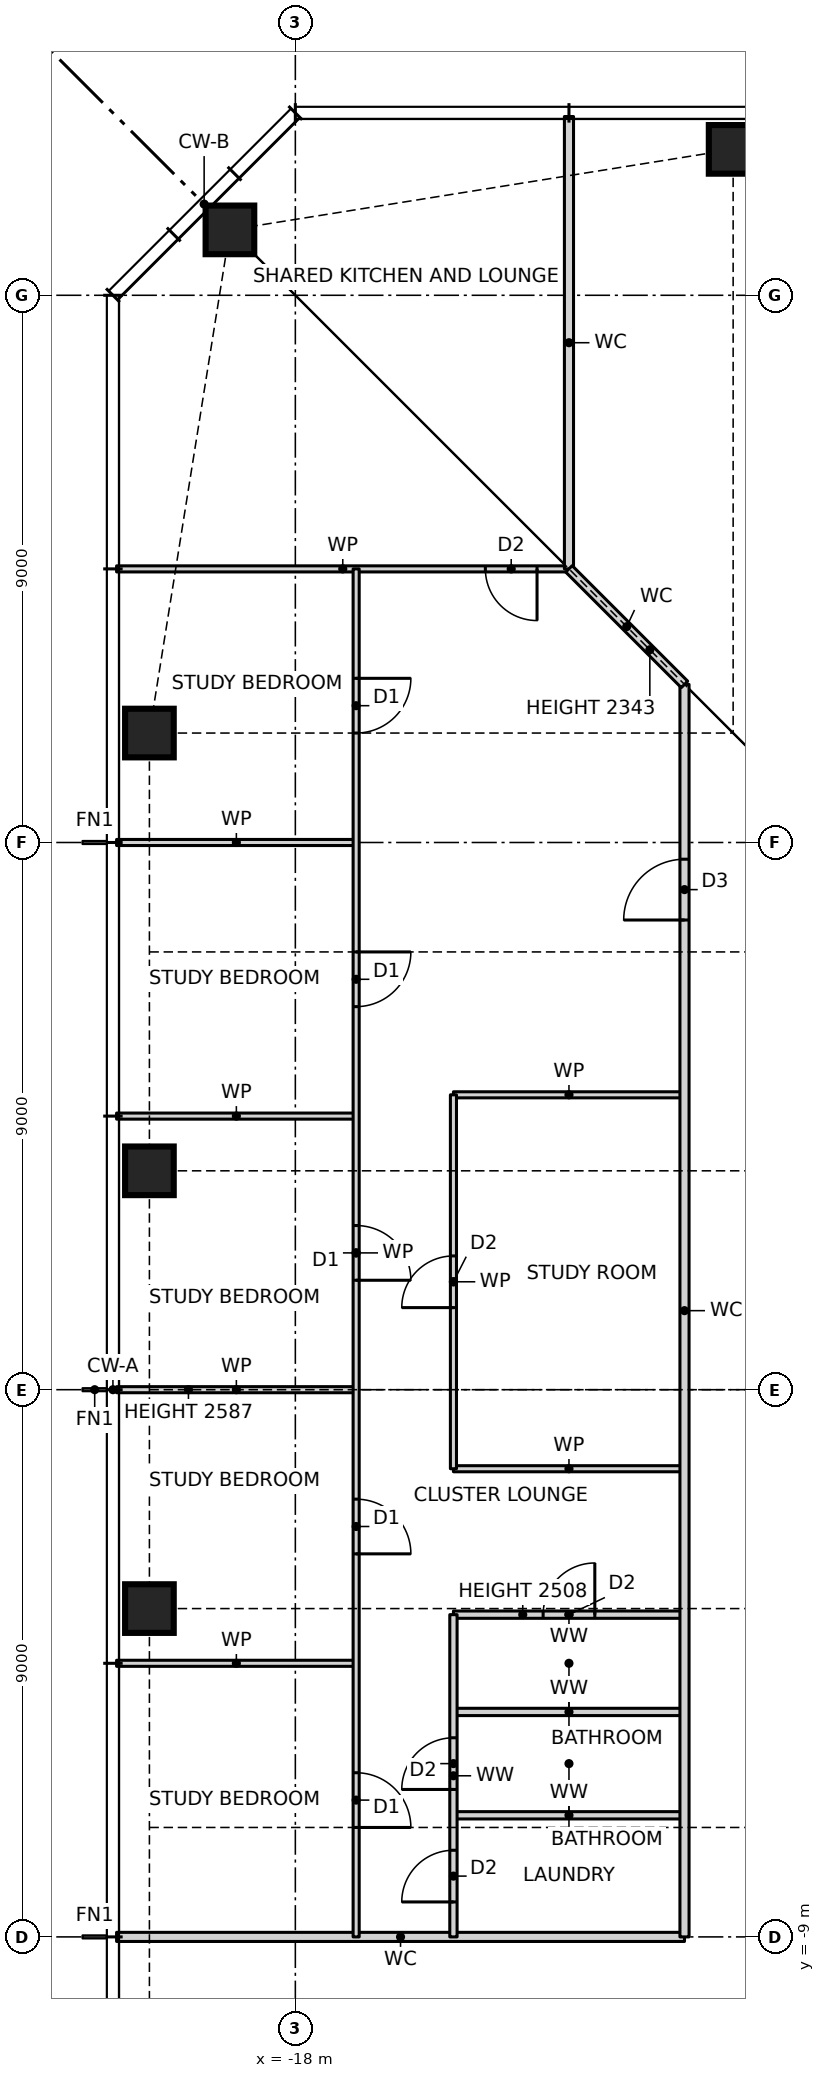
"""IFC4 building model, lengths in metres.
Left out: names, types, materials, properties, quantities, classifications, styles, units other than length and angle.
Written with IfcOpenShell. Run it as: python <this file> out.ifc"""

import sys

from ifc_helpers import new_model, si_unit, direction, frame, frame_2d, origin, origin_2d, place, context, subcontext, project, spatial, rectangle, hollow_rectangle, extrude, element, fill, save


model = new_model("IFC4")
c1 = context("Model", 3, precision=1e-05, world=origin(), true_north=direction((0.0, 1.0)))
c2 = subcontext(c1, "Body", "Model", "MODEL_VIEW")
j1 = project(units=[si_unit("LENGTHUNIT", "METRE"), si_unit("PLANEANGLEUNIT", "RADIAN")], contexts=[c1])
p1 = place(None, origin())
s1 = spatial("IfcSite", under=j1, at=p1, CompositionType="ELEMENT")
p2 = place(p1, origin())
s2 = spatial("IfcBuilding", under=s1, at=p2, CompositionType="ELEMENT")
p3 = place(p2, frame((0.0, 0.0, 94.5)))
s3 = spatial("IfcBuildingStorey", under=s2, at=p3, CompositionType="ELEMENT", Elevation=94.5)
for number, where, z_axis, x_axis in (
    (1, (-10.8, 20.4, 0.0), (0.0, 0.0, 1.0), (1.0, 0.0, 0.0)),
    (2, (-19.076, 19.076, 0.0), (0.0, 0.0, 1.0), (1.0, 0.0, 0.0)),
    (3, (-20.4, 10.8, 0.0), (0.0, 0.0, 1.0), (1.0, 0.0, 0.0)),
    (4, (-20.4, 3.6, 0.0), (0.0, 0.0, 1.0), (1.0, 0.0, 0.0)),
    (5, (-20.4, -3.6, 0.0), (0.0, 0.0, 1.0), (1.0, 0.0, 0.0)),
):
    element("IfcColumn", number, at=place(p3, frame(where, z_axis=z_axis, x_axis=x_axis)), inside=s3, PredefinedType="COLUMN", context=c2, shape_type="SweptSolid", body=[
        extrude(hollow_rectangle(XDim=0.8, YDim=0.8, WallThickness=0.07, at=origin_2d()), origin(), (0.0, 0.0, 1.0), 3.5),
    ])
p4 = place(p3, frame((-20.94, -9.0, 0.0), z_axis=(0.0, 0.0, 1.0), x_axis=(1.0, 0.0, 0.0)))
e6 = element("IfcWall", 6, at=p4, inside=s3, PredefinedType="PARTITIONING", context=c2, shape_type="SweptSolid", body=[
    extrude(rectangle(XDim=9.34, YDim=0.15, at=frame_2d((4.67, 0.0))), origin(), (0.0, 0.0, 1.0), 3.27),
])
for number, where, z_axis, x_axis in (
    (7, (-15.4, -7.0, 0.0), (0.0, 0.0, 1.0), (1.0, 0.0, 0.0)),
    (8, (-15.4, -5.3, 0.0), (0.0, 0.0, 1.0), (1.0, 0.0, 0.0)),
):
    element("IfcWall", number, at=place(p3, frame(where, z_axis=z_axis, x_axis=x_axis)), inside=s3, PredefinedType="PARTITIONING", context=c2, shape_type="SweptSolid", body=[
        extrude(rectangle(XDim=3.8, YDim=0.12, at=frame_2d((1.9, 0.0))), origin(), (0.0, 0.0, 1.0), 3.27),
    ])
p5 = place(p3, frame((-20.94, -4.5, 0.0), z_axis=(0.0, 0.0, 1.0), x_axis=(1.0, 0.0, 0.0)))
e9 = element("IfcWall", 9, at=p5, inside=s3, PredefinedType="PARTITIONING", context=c2, shape_type="SweptSolid", body=[
    extrude(rectangle(XDim=3.94, YDim=0.1, at=frame_2d((1.97, 0.0))), origin(), (0.0, 0.0, 1.0), 3.27),
])
p6 = place(p3, frame((-15.4, -3.7, 0.0), z_axis=(0.0, 0.0, 1.0), x_axis=(1.0, 0.0, 0.0)))
e10 = element("IfcWall", 10, at=p6, inside=s3, PredefinedType="PARTITIONING", context=c2, shape_type="SweptSolid", body=[
    extrude(rectangle(XDim=3.8, YDim=0.12, at=frame_2d((1.9, 0.0))), origin(), (0.0, 0.0, 1.0), 2.508),
])
p7 = place(p6, frame((1.475, 0.0, 0.0)))
e11 = element("IfcOpeningElement", 11, at=p7, cuts=e10, PredefinedType="OPENING", context=c2, shape_type="SweptSolid", body=[
    extrude(rectangle(XDim=0.85, YDim=2.1, at=frame_2d((0.425, 1.05))), frame((0.0, 0.07, 0.0), z_axis=(0.0, -1.0, 0.0), x_axis=(1.0, 0.0, 0.0)), (0.0, 0.0, 1.0), 0.14),
])
p8 = place(p3, frame((-15.4, -1.3, 0.0), z_axis=(0.0, 0.0, 1.0), x_axis=(1.0, 0.0, 0.0)))
e12 = element("IfcWall", 12, at=p8, inside=s3, PredefinedType="PARTITIONING", context=c2, shape_type="SweptSolid", body=[
    extrude(rectangle(XDim=3.8, YDim=0.1, at=frame_2d((1.9, 0.0))), origin(), (0.0, 0.0, 1.0), 3.27),
])
p9 = place(p3, frame((-20.94, 0.0, 0.0), z_axis=(0.0, 0.0, 1.0), x_axis=(1.0, 0.0, 0.0)))
e13 = element("IfcWall", 13, at=p9, inside=s3, PredefinedType="PARTITIONING", context=c2, shape_type="SweptSolid", body=[
    extrude(rectangle(XDim=3.94, YDim=0.1, at=frame_2d((1.97, 0.0))), origin(), (0.0, 0.0, 1.0), 2.587),
])
p10 = place(p3, frame((-20.94, 4.5, 0.0), z_axis=(0.0, 0.0, 1.0), x_axis=(1.0, 0.0, 0.0)))
e14 = element("IfcWall", 14, at=p10, inside=s3, PredefinedType="PARTITIONING", context=c2, shape_type="SweptSolid", body=[
    extrude(rectangle(XDim=3.94, YDim=0.1, at=frame_2d((1.97, 0.0))), origin(), (0.0, 0.0, 1.0), 3.27),
])
p11 = place(p3, frame((-15.4, 4.85, 0.0), z_axis=(0.0, 0.0, 1.0), x_axis=(1.0, 0.0, 0.0)))
e15 = element("IfcWall", 15, at=p11, inside=s3, PredefinedType="PARTITIONING", context=c2, shape_type="SweptSolid", body=[
    extrude(rectangle(XDim=3.8, YDim=0.1, at=frame_2d((1.9, 0.0))), origin(), (0.0, 0.0, 1.0), 3.27),
])
p12 = place(p3, frame((-20.94, 9.0, 0.0), z_axis=(0.0, 0.0, 1.0), x_axis=(1.0, 0.0, 0.0)))
e16 = element("IfcWall", 16, at=p12, inside=s3, PredefinedType="PARTITIONING", context=c2, shape_type="SweptSolid", body=[
    extrude(rectangle(XDim=3.94, YDim=0.1, at=frame_2d((1.97, 0.0))), origin(), (0.0, 0.0, 1.0), 3.27),
])
p13 = place(p3, frame((-20.94, 13.5, 0.0), z_axis=(0.0, 0.0, 1.0), x_axis=(1.0, 0.0, 0.0)))
e17 = element("IfcWall", 17, at=p13, inside=s3, PredefinedType="PARTITIONING", context=c2, shape_type="SweptSolid", body=[
    extrude(rectangle(XDim=7.44, YDim=0.1, at=frame_2d((3.72, 0.0))), origin(), (0.0, 0.0, 1.0), 3.27),
])
p14 = place(p13, frame((6.065, 0.0, 0.0)))
e18 = element("IfcOpeningElement", 18, at=p14, cuts=e17, PredefinedType="OPENING", context=c2, shape_type="SweptSolid", body=[
    extrude(rectangle(XDim=0.85, YDim=2.1, at=frame_2d((0.425, 1.05))), frame((0.0, 0.06, 0.0), z_axis=(0.0, -1.0, 0.0), x_axis=(1.0, 0.0, 0.0)), (0.0, 0.0, 1.0), 0.12),
])
p15 = place(p3, frame((-11.6, -9.0, 0.0), z_axis=(0.0, 0.0, 1.0), x_axis=(0.0, 1.0, 0.0)))
e19 = element("IfcWall", 19, at=p15, inside=s3, PredefinedType="PARTITIONING", context=c2, shape_type="SweptSolid", body=[
    extrude(rectangle(XDim=20.6, YDim=0.15, at=frame_2d((10.3, 0.0))), origin(), (0.0, 0.0, 1.0), 3.27),
])
p16 = place(p15, frame((16.725, 0.0, 0.0)))
e20 = element("IfcOpeningElement", 20, at=p16, cuts=e19, PredefinedType="OPENING", context=c2, shape_type="SweptSolid", body=[
    extrude(rectangle(XDim=1.0, YDim=2.1, at=frame_2d((0.5, 1.05))), frame((0.0, 0.085, 0.0), z_axis=(0.0, -1.0, 0.0), x_axis=(1.0, 0.0, 0.0)), (0.0, 0.0, 1.0), 0.17),
])
p17 = place(p3, frame((-13.5, 13.5, 0.0), z_axis=(0.0, 0.0, 1.0), x_axis=(0.0, 1.0, 0.0)))
e21 = element("IfcWall", 21, at=p17, inside=s3, PredefinedType="PARTITIONING", context=c2, shape_type="SweptSolid", body=[
    extrude(rectangle(XDim=7.44, YDim=0.15, at=frame_2d((3.72, 0.0))), origin(), (0.0, 0.0, 1.0), 3.27),
])
p18 = place(p3, frame((-15.4, -9.0, 0.0), z_axis=(0.0, 0.0, 1.0), x_axis=(0.0, 1.0, 0.0)))
e22 = element("IfcWall", 22, at=p18, inside=s3, PredefinedType="PARTITIONING", context=c2, shape_type="SweptSolid", body=[
    extrude(rectangle(XDim=5.3, YDim=0.12, at=frame_2d((2.65, 0.0))), origin(), (0.0, 0.0, 1.0), 3.27),
])
p19 = place(p18, frame((2.425, 0.0, 0.0)))
e23 = element("IfcOpeningElement", 23, at=p19, cuts=e22, PredefinedType="OPENING", context=c2, shape_type="SweptSolid", body=[
    extrude(rectangle(XDim=0.85, YDim=2.1, at=frame_2d((0.425, 1.05))), frame((0.0, 0.07, 0.0), z_axis=(0.0, -1.0, 0.0), x_axis=(1.0, 0.0, 0.0)), (0.0, 0.0, 1.0), 0.14),
])
p20 = place(p18, frame((0.575, 0.0, 0.0)))
e24 = element("IfcOpeningElement", 24, at=p20, cuts=e22, PredefinedType="OPENING", context=c2, shape_type="SweptSolid", body=[
    extrude(rectangle(XDim=0.85, YDim=2.1, at=frame_2d((0.425, 1.05))), frame((0.0, 0.07, 0.0), z_axis=(0.0, -1.0, 0.0), x_axis=(1.0, 0.0, 0.0)), (0.0, 0.0, 1.0), 0.14),
])
p21 = place(p3, frame((-15.4, -1.3, 0.0), z_axis=(0.0, 0.0, 1.0), x_axis=(0.0, 1.0, 0.0)))
e25 = element("IfcWall", 25, at=p21, inside=s3, PredefinedType="PARTITIONING", context=c2, shape_type="SweptSolid", body=[
    extrude(rectangle(XDim=6.15, YDim=0.1, at=frame_2d((3.075, 0.0))), origin(), (0.0, 0.0, 1.0), 3.27),
])
p22 = place(p21, frame((2.65, 0.0, 0.0)))
e26 = element("IfcOpeningElement", 26, at=p22, cuts=e25, PredefinedType="OPENING", context=c2, shape_type="SweptSolid", body=[
    extrude(rectangle(XDim=0.85, YDim=2.1, at=frame_2d((0.425, 1.05))), frame((0.0, 0.06, 0.0), z_axis=(0.0, -1.0, 0.0), x_axis=(1.0, 0.0, 0.0)), (0.0, 0.0, 1.0), 0.12),
])
p23 = place(p3, frame((-17.0, -9.0, 0.0), z_axis=(0.0, 0.0, 1.0), x_axis=(0.0, 1.0, 0.0)))
e27 = element("IfcWall", 27, at=p23, inside=s3, PredefinedType="PARTITIONING", context=c2, shape_type="SweptSolid", body=[
    extrude(rectangle(XDim=22.5, YDim=0.1, at=frame_2d((11.25, 0.0))), origin(), (0.0, 0.0, 1.0), 3.27),
])
p24 = place(p23, frame((19.8, 0.0, 0.0)))
e28 = element("IfcOpeningElement", 28, at=p24, cuts=e27, PredefinedType="OPENING", context=c2, shape_type="SweptSolid", body=[
    extrude(rectangle(XDim=0.9, YDim=2.1, at=frame_2d((0.45, 1.05))), frame((0.0, 0.06, 0.0), z_axis=(0.0, -1.0, 0.0), x_axis=(1.0, 0.0, 0.0)), (0.0, 0.0, 1.0), 0.12),
])
p25 = place(p23, frame((15.3, 0.0, 0.0)))
e29 = element("IfcOpeningElement", 29, at=p25, cuts=e27, PredefinedType="OPENING", context=c2, shape_type="SweptSolid", body=[
    extrude(rectangle(XDim=0.9, YDim=2.1, at=frame_2d((0.45, 1.05))), frame((0.0, 0.06, 0.0), z_axis=(0.0, -1.0, 0.0), x_axis=(1.0, 0.0, 0.0)), (0.0, 0.0, 1.0), 0.12),
])
p26 = place(p23, frame((10.8, 0.0, 0.0)))
e30 = element("IfcOpeningElement", 30, at=p26, cuts=e27, PredefinedType="OPENING", context=c2, shape_type="SweptSolid", body=[
    extrude(rectangle(XDim=0.9, YDim=2.1, at=frame_2d((0.45, 1.05))), frame((0.0, 0.06, 0.0), z_axis=(0.0, -1.0, 0.0), x_axis=(1.0, 0.0, 0.0)), (0.0, 0.0, 1.0), 0.12),
])
p27 = place(p23, frame((6.3, 0.0, 0.0)))
e31 = element("IfcOpeningElement", 31, at=p27, cuts=e27, PredefinedType="OPENING", context=c2, shape_type="SweptSolid", body=[
    extrude(rectangle(XDim=0.9, YDim=2.1, at=frame_2d((0.45, 1.05))), frame((0.0, 0.06, 0.0), z_axis=(0.0, -1.0, 0.0), x_axis=(1.0, 0.0, 0.0)), (0.0, 0.0, 1.0), 0.12),
])
p28 = place(p23, frame((1.8, 0.0, 0.0)))
e32 = element("IfcOpeningElement", 32, at=p28, cuts=e27, PredefinedType="OPENING", context=c2, shape_type="SweptSolid", body=[
    extrude(rectangle(XDim=0.9, YDim=2.1, at=frame_2d((0.45, 1.05))), frame((0.0, 0.06, 0.0), z_axis=(0.0, -1.0, 0.0), x_axis=(1.0, 0.0, 0.0)), (0.0, 0.0, 1.0), 0.12),
])
p29 = place(p3, frame((-11.6, 11.6, 0.0), z_axis=(0.0, 0.0, 1.0), x_axis=(-0.707106781187, 0.707106781187, 0.0)))
e33 = element("IfcWall", 33, at=p29, inside=s3, PredefinedType="PARTITIONING", context=c2, shape_type="SweptSolid", body=[
    extrude(rectangle(XDim=2.687, YDim=0.15, at=frame_2d((1.343, 0.0))), origin(), (0.0, 0.0, 1.0), 2.343),
])
p30 = place(p24, frame((0.9, 0.0, 0.0), z_axis=(0.0, 0.0, 1.0), x_axis=(-1.0, 0.0, 0.0)))
e34 = element("IfcDoor", 34, at=p30, inside=s3, OperationType="SINGLE_SWING_LEFT", PredefinedType="DOOR", context=c2, shape_type="SweptSolid", body=[
    extrude(rectangle(XDim=0.9, YDim=2.1, at=frame_2d((0.45, 1.05))), frame((0.0, 0.025, 0.0), z_axis=(0.0, -1.0, 0.0), x_axis=(1.0, 0.0, 0.0)), (0.0, 0.0, 1.0), 0.05),
])
fill(e28, e34)
p31 = place(p25, frame((0.9, 0.0, 0.0), z_axis=(0.0, 0.0, 1.0), x_axis=(-1.0, 0.0, 0.0)))
e35 = element("IfcDoor", 35, at=p31, inside=s3, OperationType="SINGLE_SWING_LEFT", PredefinedType="DOOR", context=c2, shape_type="SweptSolid", body=[
    extrude(rectangle(XDim=0.9, YDim=2.1, at=frame_2d((0.45, 1.05))), frame((0.0, 0.025, 0.0), z_axis=(0.0, -1.0, 0.0), x_axis=(1.0, 0.0, 0.0)), (0.0, 0.0, 1.0), 0.05),
])
fill(e29, e35)
p32 = place(p26, frame((0.9, 0.0, 0.0), z_axis=(0.0, 0.0, 1.0), x_axis=(-1.0, 0.0, 0.0)))
e36 = element("IfcDoor", 36, at=p32, inside=s3, OperationType="SINGLE_SWING_RIGHT", PredefinedType="DOOR", context=c2, shape_type="SweptSolid", body=[
    extrude(rectangle(XDim=0.9, YDim=2.1, at=frame_2d((0.45, 1.05))), frame((0.0, 0.025, 0.0), z_axis=(0.0, -1.0, 0.0), x_axis=(1.0, 0.0, 0.0)), (0.0, 0.0, 1.0), 0.05),
])
fill(e30, e36)
p33 = place(p27, frame((0.9, 0.0, 0.0), z_axis=(0.0, 0.0, 1.0), x_axis=(-1.0, 0.0, 0.0)))
e37 = element("IfcDoor", 37, at=p33, inside=s3, OperationType="SINGLE_SWING_RIGHT", PredefinedType="DOOR", context=c2, shape_type="SweptSolid", body=[
    extrude(rectangle(XDim=0.9, YDim=2.1, at=frame_2d((0.45, 1.05))), frame((0.0, 0.025, 0.0), z_axis=(0.0, -1.0, 0.0), x_axis=(1.0, 0.0, 0.0)), (0.0, 0.0, 1.0), 0.05),
])
fill(e31, e37)
p34 = place(p28, frame((0.9, 0.0, 0.0), z_axis=(0.0, 0.0, 1.0), x_axis=(-1.0, 0.0, 0.0)))
e38 = element("IfcDoor", 38, at=p34, inside=s3, OperationType="SINGLE_SWING_RIGHT", PredefinedType="DOOR", context=c2, shape_type="SweptSolid", body=[
    extrude(rectangle(XDim=0.9, YDim=2.1, at=frame_2d((0.45, 1.05))), frame((0.0, 0.025, 0.0), z_axis=(0.0, -1.0, 0.0), x_axis=(1.0, 0.0, 0.0)), (0.0, 0.0, 1.0), 0.05),
])
fill(e32, e38)
p35 = place(p16, origin())
e39 = element("IfcDoor", 39, at=p35, inside=s3, OperationType="SINGLE_SWING_LEFT", PredefinedType="DOOR", context=c2, shape_type="SweptSolid", body=[
    extrude(rectangle(XDim=1.0, YDim=2.1, at=frame_2d((0.5, 1.05))), frame((0.0, 0.025, 0.0), z_axis=(0.0, -1.0, 0.0), x_axis=(1.0, 0.0, 0.0)), (0.0, 0.0, 1.0), 0.05),
])
fill(e20, e39)
p36 = place(p22, origin())
e40 = element("IfcDoor", 40, at=p36, inside=s3, OperationType="SINGLE_SWING_LEFT", PredefinedType="DOOR", context=c2, shape_type="SweptSolid", body=[
    extrude(rectangle(XDim=0.85, YDim=2.1, at=frame_2d((0.425, 1.05))), frame((0.0, 0.025, 0.0), z_axis=(0.0, -1.0, 0.0), x_axis=(1.0, 0.0, 0.0)), (0.0, 0.0, 1.0), 0.05),
])
fill(e26, e40)
p37 = place(p7, origin())
e41 = element("IfcDoor", 41, at=p37, inside=s3, OperationType="SINGLE_SWING_RIGHT", PredefinedType="DOOR", context=c2, shape_type="SweptSolid", body=[
    extrude(rectangle(XDim=0.85, YDim=2.1, at=frame_2d((0.425, 1.05))), frame((0.0, 0.025, 0.0), z_axis=(0.0, -1.0, 0.0), x_axis=(1.0, 0.0, 0.0)), (0.0, 0.0, 1.0), 0.05),
])
fill(e11, e41)
p38 = place(p19, origin())
e42 = element("IfcDoor", 42, at=p38, inside=s3, OperationType="SINGLE_SWING_LEFT", PredefinedType="DOOR", context=c2, shape_type="SweptSolid", body=[
    extrude(rectangle(XDim=0.85, YDim=2.1, at=frame_2d((0.425, 1.05))), frame((0.0, 0.025, 0.0), z_axis=(0.0, -1.0, 0.0), x_axis=(1.0, 0.0, 0.0)), (0.0, 0.0, 1.0), 0.05),
])
fill(e23, e42)
p39 = place(p20, origin())
e43 = element("IfcDoor", 43, at=p39, inside=s3, OperationType="SINGLE_SWING_LEFT", PredefinedType="DOOR", context=c2, shape_type="SweptSolid", body=[
    extrude(rectangle(XDim=0.85, YDim=2.1, at=frame_2d((0.425, 1.05))), frame((0.0, 0.025, 0.0), z_axis=(0.0, -1.0, 0.0), x_axis=(1.0, 0.0, 0.0)), (0.0, 0.0, 1.0), 0.05),
])
fill(e24, e43)
p40 = place(p14, frame((0.85, 0.0, 0.0), z_axis=(0.0, 0.0, 1.0), x_axis=(-1.0, 0.0, 0.0)))
e44 = element("IfcDoor", 44, at=p40, inside=s3, OperationType="SINGLE_SWING_LEFT", PredefinedType="DOOR", context=c2, shape_type="SweptSolid", body=[
    extrude(rectangle(XDim=0.85, YDim=2.1, at=frame_2d((0.425, 1.05))), frame((0.0, 0.025, 0.0), z_axis=(0.0, -1.0, 0.0), x_axis=(1.0, 0.0, 0.0)), (0.0, 0.0, 1.0), 0.05),
])
fill(e18, e44)
save(model, sys.argv[1])
